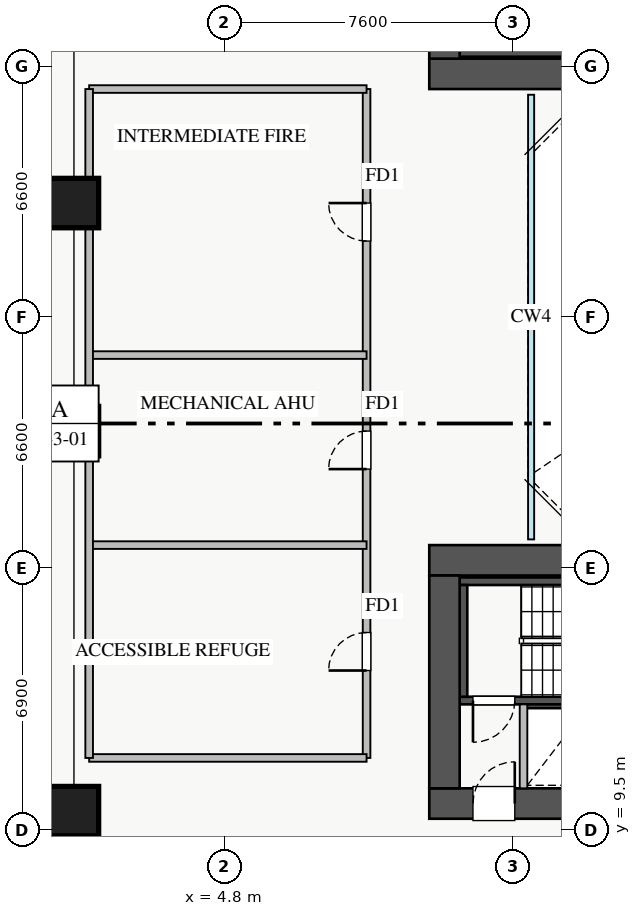
"""IFC4 building model, lengths in metres.
Left out: names, types, materials, properties, quantities, classifications, styles, units other than length and angle.
Written with IfcOpenShell. Run it as: python <this file> out.ifc"""

import sys

from ifc_helpers import new_model, si_unit, direction, frame, frame_2d, origin, origin_2d, place, context, subcontext, project, spatial, rectangle, extrude, source, transform, mapped, element, fill, save


model = new_model("IFC4")
c1 = context("Model", 3, precision=1e-05, world=origin(), true_north=direction((0.0, 1.0)))
c2 = subcontext(c1, "Body", "Model", "MODEL_VIEW")
j1 = project(units=[si_unit("LENGTHUNIT", "METRE"), si_unit("PLANEANGLEUNIT", "RADIAN")], contexts=[c1])
p1 = place(None, origin())
s1 = spatial("IfcSite", under=j1, at=p1, CompositionType="ELEMENT")
p2 = place(p1, origin())
s2 = spatial("IfcBuilding", under=s1, at=p2, CompositionType="ELEMENT")
p3 = place(p2, frame((0.0, 0.0, 45.75)))
s3 = spatial("IfcBuildingStorey", under=s2, at=p3, CompositionType="ELEMENT", Elevation=45.75)
p4 = place(p3, frame((12.68, 12.8, 0.0), z_axis=(0.0, 0.0, 1.0), x_axis=(1.0, 0.0, 0.0)))
e1 = element("IfcWall", 1, at=p4, inside=s3, PredefinedType="SHEAR", context=c2, shape_type="SweptSolid", body=[
    extrude(rectangle(XDim=1.94, YDim=0.18, at=frame_2d((0.97, 0.0))), origin(), (0.0, 0.0, 1.0), 4.32),
])
p5 = place(p3, frame((11.0, 29.95, 0.0), z_axis=(0.0, 0.0, 1.0), x_axis=(1.0, 0.0, 0.0)))
e2 = element("IfcWall", 2, at=p5, inside=s3, PredefinedType="SHEAR", context=c2, shape_type="SweptSolid", body=[
    extrude(rectangle(XDim=7.15, YDim=0.2, at=frame_2d((3.575, 0.0))), origin(), (0.0, 0.0, 1.0), 4.5),
])
p6 = place(p3, frame((11.0, 12.91, 0.0), z_axis=(0.0, 0.0, 1.0), x_axis=(1.0, 0.0, 0.0)))
e3 = element("IfcWall", 3, at=p6, inside=s3, PredefinedType="SHEAR", context=c2, shape_type="SweptSolid", body=[
    extrude(rectangle(XDim=7.15, YDim=0.2, at=frame_2d((3.575, 0.0))), origin(), (0.0, 0.0, 1.0), 4.5),
])
p7 = place(p6, frame((0.35, 0.0, 0.0)))
e4 = element("IfcOpeningElement", 4, at=p7, cuts=e3, PredefinedType="OPENING", context=c2, shape_type="SweptSolid", body=[
    extrude(rectangle(XDim=1.1, YDim=2.05, at=frame_2d((0.55, 1.025))), frame((0.0, 0.11, 0.0), z_axis=(0.0, -1.0, 0.0), x_axis=(1.0, 0.0, 0.0)), (0.0, 0.0, 1.0), 0.22),
])
p8 = place(p3, frame((11.0, 16.05, 0.0), z_axis=(0.0, 0.0, 1.0), x_axis=(1.0, 0.0, 0.0)))
e5 = element("IfcWall", 5, at=p8, inside=s3, PredefinedType="SHEAR", context=c2, shape_type="SweptSolid", body=[
    extrude(rectangle(XDim=7.15, YDim=0.2, at=frame_2d((3.575, 0.0))), origin(), (0.0, 0.0, 1.0), 4.5),
])
p9 = place(p3, frame((11.1, 13.01, 0.0), z_axis=(0.0, 0.0, 1.0), x_axis=(0.0, 1.0, 0.0)))
e6 = element("IfcWall", 6, at=p9, inside=s3, PredefinedType="SHEAR", context=c2, shape_type="SweptSolid", body=[
    extrude(rectangle(XDim=2.94, YDim=0.2, at=frame_2d((1.47, 0.0))), origin(), (0.0, 0.0, 1.0), 4.5),
])
p10 = place(p3, frame((10.2, 29.4, 0.0), z_axis=(0.0, 0.0, 1.0), x_axis=(1.0, 0.0, 0.0)))
e7 = element("IfcWall", 7, at=p10, inside=s3, PredefinedType="SHEAR", context=c2, shape_type="SweptSolid", body=[
    extrude(rectangle(XDim=17.6, YDim=0.8, at=frame_2d((8.8, 0.0))), origin(), (0.0, 0.0, 1.0), 4.5),
])
p11 = place(p3, frame((10.6, 29.8, 0.0), z_axis=(0.0, 0.0, 1.0), x_axis=(0.0, 1.0, 0.0)))
e8 = element("IfcWall", 8, at=p11, inside=s3, PredefinedType="SHEAR", context=c2, shape_type="SweptSolid", body=[
    extrude(rectangle(XDim=5.6, YDim=0.8, at=frame_2d((2.8, 0.0))), origin(), (0.0, 0.0, 1.0), 4.5),
])
p12 = place(p3, frame((10.2, 10.2, 0.0), z_axis=(0.0, 0.0, 1.0), x_axis=(1.0, 0.0, 0.0)))
e9 = element("IfcWall", 9, at=p12, inside=s3, PredefinedType="SHEAR", context=c2, shape_type="SweptSolid", body=[
    extrude(rectangle(XDim=17.6, YDim=0.8, at=frame_2d((8.8, 0.0))), origin(), (0.0, 0.0, 1.0), 4.5),
])
p13 = place(p12, frame((1.15, 0.0, 0.0)))
e10 = element("IfcOpeningElement", 10, at=p13, cuts=e9, PredefinedType="OPENING", context=c2, shape_type="SweptSolid", body=[
    extrude(rectangle(XDim=1.1, YDim=2.05, at=frame_2d((0.55, 1.025))), frame((0.0, 0.41, 0.0), z_axis=(0.0, -1.0, 0.0), x_axis=(1.0, 0.0, 0.0)), (0.0, 0.0, 1.0), 0.82),
])
p14 = place(p12, frame((8.3, 0.0, 0.0)))
e11 = element("IfcOpeningElement", 11, at=p14, cuts=e9, PredefinedType="OPENING", context=c2, shape_type="SweptSolid", body=[
    extrude(rectangle(XDim=1.1, YDim=2.05, at=frame_2d((0.55, 1.025))), frame((0.0, 0.41, 0.0), z_axis=(0.0, -1.0, 0.0), x_axis=(1.0, 0.0, 0.0)), (0.0, 0.0, 1.0), 0.82),
])
p15 = place(p12, frame((10.05, 0.0, 0.0)))
e12 = element("IfcOpeningElement", 12, at=p15, cuts=e9, PredefinedType="OPENING", context=c2, shape_type="SweptSolid", body=[
    extrude(rectangle(XDim=1.1, YDim=2.05, at=frame_2d((0.55, 1.025))), frame((0.0, 0.41, 0.0), z_axis=(0.0, -1.0, 0.0), x_axis=(1.0, 0.0, 0.0)), (0.0, 0.0, 1.0), 0.82),
])
p16 = place(p12, frame((4.9, 0.0, 0.0)))
e13 = element("IfcOpeningElement", 13, at=p16, cuts=e9, PredefinedType="OPENING", context=c2, shape_type="SweptSolid", body=[
    extrude(rectangle(XDim=1.1, YDim=2.05, at=frame_2d((0.55, 1.025))), frame((0.0, 0.41, 0.0), z_axis=(0.0, -1.0, 0.0), x_axis=(1.0, 0.0, 0.0)), (0.0, 0.0, 1.0), 0.82),
])
p17 = place(p12, frame((14.74, 0.0, 0.0)))
e14 = element("IfcOpeningElement", 14, at=p17, cuts=e9, PredefinedType="OPENING", context=c2, shape_type="SweptSolid", body=[
    extrude(rectangle(XDim=1.0, YDim=2.05, at=frame_2d((0.5, 1.025))), frame((0.0, 0.41, 0.0), z_axis=(0.0, -1.0, 0.0), x_axis=(1.0, 0.0, 0.0)), (0.0, 0.0, 1.0), 0.82),
])
p18 = place(p12, frame((11.945, 0.0, 0.0)))
e15 = element("IfcOpeningElement", 15, at=p18, cuts=e9, PredefinedType="OPENING", context=c2, shape_type="SweptSolid", body=[
    extrude(rectangle(XDim=1.0, YDim=2.05, at=frame_2d((0.5, 1.025))), frame((0.0, 0.41, 0.0), z_axis=(0.0, -1.0, 0.0), x_axis=(1.0, 0.0, 0.0)), (0.0, 0.0, 1.0), 0.82),
])
p19 = place(p12, frame((13.48, 0.0, 0.0)))
e16 = element("IfcOpeningElement", 16, at=p19, cuts=e9, PredefinedType="OPENING", context=c2, shape_type="SweptSolid", body=[
    extrude(rectangle(XDim=1.0, YDim=2.05, at=frame_2d((0.5, 1.025))), frame((0.0, 0.41, 0.0), z_axis=(0.0, -1.0, 0.0), x_axis=(1.0, 0.0, 0.0)), (0.0, 0.0, 1.0), 0.82),
])
p20 = place(p3, frame((10.2, 16.6, 0.0), z_axis=(0.0, 0.0, 1.0), x_axis=(1.0, 0.0, 0.0)))
e17 = element("IfcWall", 17, at=p20, inside=s3, PredefinedType="SHEAR", context=c2, shape_type="SweptSolid", body=[
    extrude(rectangle(XDim=17.6, YDim=0.8, at=frame_2d((8.8, 0.0))), origin(), (0.0, 0.0, 1.0), 4.5),
])
p21 = place(p3, frame((10.6, 10.6, 0.0), z_axis=(0.0, 0.0, 1.0), x_axis=(0.0, 1.0, 0.0)))
e18 = element("IfcWall", 18, at=p21, inside=s3, PredefinedType="SHEAR", context=c2, shape_type="SweptSolid", body=[
    extrude(rectangle(XDim=5.6, YDim=0.8, at=frame_2d((2.8, 0.0))), origin(), (0.0, 0.0, 1.0), 4.5),
])
m1 = source(origin(), c2, "Body", "SweptSolid", [
    extrude(rectangle(XDim=1.3, YDim=1.3, at=origin_2d()), origin(), (0.0, 0.0, 1.0), 4.5),
])
for number, where, z_axis, x_axis in (
    (19, (0.85, 26.0, 0.0), (0.0, 0.0, 1.0), (1.0, 0.0, 0.0)),
    (20, (0.85, 20.0, 0.0), (0.0, 0.0, 1.0), (1.0, 0.0, 0.0)),
    (21, (0.85, 10.0, 0.0), (0.0, 0.0, 1.0), (1.0, 0.0, 0.0)),
):
    element("IfcColumn", number, at=place(p3, frame(where, z_axis=z_axis, x_axis=x_axis)), inside=s3, PredefinedType="COLUMN", context=c2, shape_type="MappedRepresentation", body=[
        mapped(m1, transform((0.0, 0.0, 0.0), x_axis=(1.0, 0.0, 0.0), y_axis=(0.0, 1.0, 0.0), z_axis=(0.0, 0.0, 1.0), scale=1.0)),
    ])
p22 = place(p3, frame((12.68, 10.6, 0.0), z_axis=(0.0, 0.0, 1.0), x_axis=(0.0, 1.0, 0.0)))
e22 = element("IfcWall", 22, at=p22, inside=s3, PredefinedType="PARTITIONING", context=c2, shape_type="SweptSolid", body=[
    extrude(rectangle(XDim=2.21, YDim=0.2, at=frame_2d((1.105, 0.0))), origin(), (0.0, 0.0, 1.0), 4.32),
])
p23 = place(p3, frame((8.55, 11.4, 0.0), z_axis=(0.0, 0.0, 1.0), x_axis=(0.0, 1.0, 0.0)))
e23 = element("IfcWall", 23, at=p23, inside=s3, PredefinedType="PARTITIONING", context=c2, shape_type="SweptSolid", body=[
    extrude(rectangle(XDim=17.6, YDim=0.2, at=frame_2d((8.8, 0.0))), origin(), (0.0, 0.0, 1.0), 4.32),
])
p24 = place(p23, frame((7.6, 0.0, 0.0)))
e24 = element("IfcOpeningElement", 24, at=p24, cuts=e23, PredefinedType="OPENING", context=c2, shape_type="SweptSolid", body=[
    extrude(rectangle(XDim=1.0, YDim=2.05, at=frame_2d((0.5, 1.025))), frame((0.0, 0.11, 0.0), z_axis=(0.0, -1.0, 0.0), x_axis=(1.0, 0.0, 0.0)), (0.0, 0.0, 1.0), 0.22),
])
p25 = place(p23, frame((13.6, 0.0, 0.0)))
e25 = element("IfcOpeningElement", 25, at=p25, cuts=e23, PredefinedType="OPENING", context=c2, shape_type="SweptSolid", body=[
    extrude(rectangle(XDim=1.0, YDim=2.05, at=frame_2d((0.5, 1.025))), frame((0.0, 0.11, 0.0), z_axis=(0.0, -1.0, 0.0), x_axis=(1.0, 0.0, 0.0)), (0.0, 0.0, 1.0), 0.22),
])
p26 = place(p23, frame((2.3, 0.0, 0.0)))
e26 = element("IfcOpeningElement", 26, at=p26, cuts=e23, PredefinedType="OPENING", context=c2, shape_type="SweptSolid", body=[
    extrude(rectangle(XDim=1.0, YDim=2.05, at=frame_2d((0.5, 1.025))), frame((0.0, 0.11, 0.0), z_axis=(0.0, -1.0, 0.0), x_axis=(1.0, 0.0, 0.0)), (0.0, 0.0, 1.0), 0.22),
])
for number, where, z_axis, x_axis in (
    (27, (1.25, 11.4, 0.0), (0.0, 0.0, 1.0), (1.0, 0.0, 0.0)),
    (28, (1.25, 17.0, 0.0), (0.0, 0.0, 1.0), (1.0, 0.0, 0.0)),
    (29, (1.25, 22.0, 0.0), (0.0, 0.0, 1.0), (1.0, 0.0, 0.0)),
    (30, (1.25, 29.0, 0.0), (0.0, 0.0, 1.0), (1.0, 0.0, 0.0)),
):
    element("IfcWall", number, at=place(p3, frame(where, z_axis=z_axis, x_axis=x_axis)), inside=s3, PredefinedType="PARTITIONING", context=c2, shape_type="SweptSolid", body=[
        extrude(rectangle(XDim=7.3, YDim=0.2, at=frame_2d((3.65, 0.0))), origin(), (0.0, 0.0, 1.0), 4.32),
    ])
p27 = place(p3, frame((1.25, 11.4, 0.0), z_axis=(0.0, 0.0, 1.0), x_axis=(0.0, 1.0, 0.0)))
e31 = element("IfcWall", 31, at=p27, inside=s3, PredefinedType="PARTITIONING", context=c2, shape_type="SweptSolid", body=[
    extrude(rectangle(XDim=17.6, YDim=0.2, at=frame_2d((8.8, 0.0))), origin(), (0.0, 0.0, 1.0), 4.32),
])
m2 = source(origin(), c2, "Body", "SweptSolid", [
    extrude(rectangle(XDim=1.1, YDim=2.05, at=frame_2d((0.55, 1.025))), frame((0.0, 0.025, 0.0), z_axis=(0.0, -1.0, 0.0), x_axis=(1.0, 0.0, 0.0)), (0.0, 0.0, 1.0), 0.05),
])
p28 = place(p13, origin())
e32 = element("IfcDoor", 32, at=p28, inside=s3, OperationType="SINGLE_SWING_RIGHT", PredefinedType="DOOR", context=c2, shape_type="MappedRepresentation", body=[
    mapped(m2, transform((0.0, 0.0, 0.0), x_axis=(1.0, 0.0, 0.0), y_axis=(0.0, 1.0, 0.0), z_axis=(0.0, 0.0, 1.0), scale=1.0)),
])
fill(e10, e32)
p29 = place(p7, frame((1.1, 0.0, 0.0), z_axis=(0.0, 0.0, 1.0), x_axis=(-1.0, 0.0, 0.0)))
e33 = element("IfcDoor", 33, at=p29, inside=s3, OperationType="SINGLE_SWING_LEFT", PredefinedType="DOOR", context=c2, shape_type="MappedRepresentation", body=[
    mapped(m2, transform((0.0, 0.0, 0.0), x_axis=(1.0, 0.0, 0.0), y_axis=(0.0, 1.0, 0.0), z_axis=(0.0, 0.0, 1.0), scale=1.0)),
])
fill(e4, e33)
m3 = source(origin(), c2, "Body", "SweptSolid", [
    extrude(rectangle(XDim=1.0, YDim=2.05, at=frame_2d((0.5, 1.025))), frame((0.0, 0.025, 0.0), z_axis=(0.0, -1.0, 0.0), x_axis=(1.0, 0.0, 0.0)), (0.0, 0.0, 1.0), 0.05),
])
p30 = place(p24, origin())
e34 = element("IfcDoor", 34, at=p30, inside=s3, OperationType="SINGLE_SWING_LEFT", PredefinedType="DOOR", context=c2, shape_type="MappedRepresentation", body=[
    mapped(m3, transform((0.0, 0.0, 0.0), x_axis=(1.0, 0.0, 0.0), y_axis=(0.0, 1.0, 0.0), z_axis=(0.0, 0.0, 1.0), scale=1.0)),
])
fill(e24, e34)
p31 = place(p25, origin())
e35 = element("IfcDoor", 35, at=p31, inside=s3, OperationType="SINGLE_SWING_RIGHT", PredefinedType="DOOR", context=c2, shape_type="MappedRepresentation", body=[
    mapped(m3, transform((0.0, 0.0, 0.0), x_axis=(1.0, 0.0, 0.0), y_axis=(0.0, 1.0, 0.0), z_axis=(0.0, 0.0, 1.0), scale=1.0)),
])
fill(e25, e35)
p32 = place(p26, origin())
e36 = element("IfcDoor", 36, at=p32, inside=s3, OperationType="SINGLE_SWING_LEFT", PredefinedType="DOOR", context=c2, shape_type="MappedRepresentation", body=[
    mapped(m3, transform((0.0, 0.0, 0.0), x_axis=(1.0, 0.0, 0.0), y_axis=(0.0, 1.0, 0.0), z_axis=(0.0, 0.0, 1.0), scale=1.0)),
])
fill(e26, e36)
save(model, sys.argv[1])
